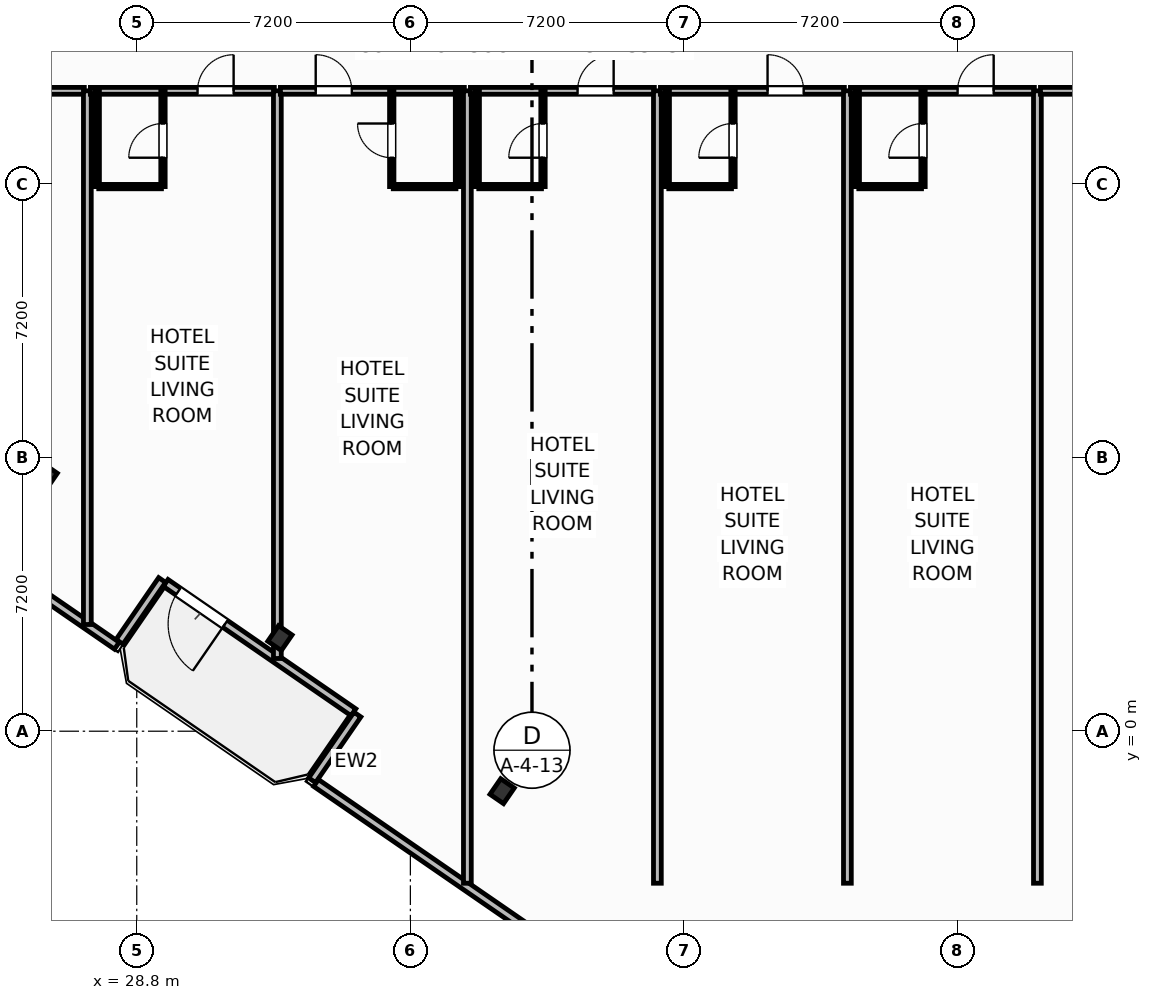
"""IFC4 building model, lengths in metres.
Left out: names, types, materials, properties, quantities, classifications, styles, units other than length and angle.
Written with IfcOpenShell. Run it as: python <this file> out.ifc"""

import sys

from ifc_helpers import new_model, si_unit, direction, frame, frame_2d, origin, origin_2d, place, context, subcontext, project, spatial, rectangle, i_section, extrude, element, fill, save


model = new_model("IFC4")
c1 = context("Model", 3, precision=1e-05, world=origin(), true_north=direction((0.0, 1.0)))
c2 = subcontext(c1, "Body", "Model", "MODEL_VIEW")
j1 = project(units=[si_unit("LENGTHUNIT", "METRE"), si_unit("PLANEANGLEUNIT", "RADIAN")], contexts=[c1])
p1 = place(None, origin())
s1 = spatial("IfcSite", under=j1, at=p1, CompositionType="ELEMENT")
p2 = place(p1, origin())
s2 = spatial("IfcBuilding", under=s1, at=p2, CompositionType="ELEMENT")
p3 = place(p2, frame((0.0, 0.0, 27.0)))
s3 = spatial("IfcBuildingStorey", under=s2, at=p3, CompositionType="ELEMENT", Elevation=27.0)
for number, where, z_axis, x_axis in (
    (1, (26.391, 6.705, -0.25), (0.0, 0.0, 1.0), (0.824, -0.567, 0.0)),
    (2, (32.568, 2.45, -0.25), (0.0, 0.0, 1.0), (0.824, -0.567, 0.0)),
    (3, (38.415, -1.577, -0.25), (0.0, 0.0, 1.0), (0.824, -0.567, 0.0)),
):
    element("IfcColumn", number, at=place(p3, frame(where, z_axis=z_axis, x_axis=x_axis)), inside=s3, PredefinedType="COLUMN", context=c2, shape_type="SweptSolid", body=[
        extrude(i_section(OverallWidth=0.432, OverallDepth=0.498, WebThickness=0.056, FlangeThickness=0.089, FilletRadius=0.025, at=origin_2d()), origin(), (0.0, 0.0, 1.0), 3.95),
    ])
p4 = place(p3, frame((34.502, 0.499, 0.0), z_axis=(0.0, 0.0, 1.0), x_axis=(-0.823534636215, 0.567265989598, 0.0)))
e4 = element("IfcWall", 4, at=p4, inside=s3, PredefinedType="SOLIDWALL", context=c2, shape_type="SweptSolid", body=[
    extrude(rectangle(XDim=6.0, YDim=0.22, at=frame_2d((3.0, 0.0))), origin(), (0.0, 0.0, 1.0), 2.73),
])
p5 = place(p4, frame((4.1, 0.0, 0.0)))
e5 = element("IfcOpeningElement", 5, at=p5, cuts=e4, PredefinedType="OPENING", context=c2, shape_type="SweptSolid", body=[
    extrude(rectangle(XDim=1.5, YDim=2.25, at=frame_2d((0.75, 1.125))), frame((0.0, 0.12, 0.0), z_axis=(0.0, -1.0, 0.0), x_axis=(1.0, 0.0, 0.0)), (0.0, 0.0, 1.0), 0.24),
])
p6 = place(p3, frame((21.659, 6.807, 0.0), z_axis=(0.0, 0.0, 1.0), x_axis=(0.823535360023, -0.567264938799, 0.0)))
e6 = element("IfcWall", 6, at=p6, inside=s3, PredefinedType="SOLIDWALL", context=c2, shape_type="SweptSolid", body=[
    extrude(rectangle(XDim=8.035, YDim=0.22, at=frame_2d((4.018, 0.0))), origin(), (0.0, 0.0, 1.0), 2.73),
])
p7 = place(p6, frame((3.192, 0.0, 0.8)))
e7 = element("IfcOpeningElement", 7, at=p7, cuts=e6, PredefinedType="OPENING", context=c2, shape_type="SweptSolid", body=[
    extrude(rectangle(XDim=1.65, YDim=1.65, at=frame_2d((0.825, 0.825))), frame((0.0, 0.12, 0.0), z_axis=(0.0, -1.0, 0.0), x_axis=(1.0, 0.0, 0.0)), (0.0, 0.0, 1.0), 0.24),
])
p8 = place(p3, frame((28.347, 2.352, 0.0), z_axis=(0.0, 0.0, 1.0), x_axis=(0.567215821234, 0.823569190865, 0.0)))
e8 = element("IfcWall", 8, at=p8, inside=s3, PredefinedType="SOLIDWALL", context=c2, shape_type="SweptSolid", body=[
    extrude(rectangle(XDim=1.975, YDim=0.22, at=frame_2d((0.988, 0.0))), origin(), (0.0, 0.0, 1.0), 2.73),
])
p9 = place(p3, frame((34.606, 0.439, 0.0), z_axis=(0.0, 0.0, 1.0), x_axis=(-0.567219383419, -0.823566737474, 0.0)))
e9 = element("IfcWall", 9, at=p9, inside=s3, PredefinedType="SOLIDWALL", context=c2, shape_type="SweptSolid", body=[
    extrude(rectangle(XDim=2.1, YDim=0.22, at=frame_2d((1.05, 0.0))), origin(), (0.0, 0.0, 1.0), 2.73),
])
p10 = place(p3, frame((33.518, -1.362, 0.0), z_axis=(0.0, 0.0, 1.0), x_axis=(0.82353935489, -0.567259139148, 0.0)))
e10 = element("IfcWall", 10, at=p10, inside=s3, PredefinedType="SOLIDWALL", context=c2, shape_type="SweptSolid", body=[
    extrude(rectangle(XDim=23.147, YDim=0.22, at=frame_2d((11.573, 0.0))), origin(), (0.0, 0.0, 1.0), 2.73),
])
p11 = place(p10, frame((10.749, 0.0, 0.8)))
e11 = element("IfcOpeningElement", 11, at=p11, cuts=e10, PredefinedType="OPENING", context=c2, shape_type="SweptSolid", body=[
    extrude(rectangle(XDim=1.65, YDim=1.65, at=frame_2d((0.825, 0.825))), frame((0.0, 0.12, 0.0), z_axis=(0.0, -1.0, 0.0), x_axis=(1.0, 0.0, 0.0)), (0.0, 0.0, 1.0), 0.24),
])
p12 = place(p3, frame((22.58, 16.85, 0.0), z_axis=(0.0, 0.0, 1.0), x_axis=(1.0, 0.0, 0.0)))
e12 = element("IfcWall", 12, at=p12, inside=s3, PredefinedType="PARTITIONING", context=c2, shape_type="SweptSolid", body=[
    extrude(rectangle(XDim=4.84, YDim=0.18, at=frame_2d((2.42, 0.0))), origin(), (0.0, 0.0, 1.0), 3.45),
])
p13 = place(p12, frame((2.819, 0.0, 0.0)))
e13 = element("IfcOpeningElement", 13, at=p13, cuts=e12, PredefinedType="OPENING", context=c2, shape_type="SweptSolid", body=[
    extrude(rectangle(XDim=0.95, YDim=2.15, at=frame_2d((0.475, 1.075))), frame((0.0, 0.1, 0.0), z_axis=(0.0, -1.0, 0.0), x_axis=(1.0, 0.0, 0.0)), (0.0, 0.0, 1.0), 0.2),
])
p14 = place(p3, frame((27.5, 2.808, 0.0), z_axis=(0.0, 0.0, 1.0), x_axis=(0.0, 1.0, 0.0)))
e14 = element("IfcWall", 14, at=p14, inside=s3, PredefinedType="PARTITIONING", context=c2, shape_type="SweptSolid", body=[
    extrude(rectangle(XDim=14.042, YDim=0.205, at=frame_2d((7.021, 0.0))), origin(), (0.0, 0.0, 1.0), 3.45),
])
p15 = place(p3, frame((27.58, 16.85, 0.0), z_axis=(0.0, 0.0, 1.0), x_axis=(1.0, 0.0, 0.0)))
e15 = element("IfcWall", 15, at=p15, inside=s3, PredefinedType="PARTITIONING", context=c2, shape_type="SweptSolid", body=[
    extrude(rectangle(XDim=4.84, YDim=0.18, at=frame_2d((2.42, 0.0))), origin(), (0.0, 0.0, 1.0), 3.45),
])
p16 = place(p15, frame((2.819, 0.0, 0.0)))
e16 = element("IfcOpeningElement", 16, at=p16, cuts=e15, PredefinedType="OPENING", context=c2, shape_type="SweptSolid", body=[
    extrude(rectangle(XDim=0.95, YDim=2.15, at=frame_2d((0.475, 1.075))), frame((0.0, 0.1, 0.0), z_axis=(0.0, -1.0, 0.0), x_axis=(1.0, 0.0, 0.0)), (0.0, 0.0, 1.0), 0.2),
])
p17 = place(p3, frame((27.8, 14.33, 0.0), z_axis=(0.0, 0.0, 1.0), x_axis=(1.0, 0.0, 0.0)))
e17 = element("IfcWall", 17, at=p17, inside=s3, PredefinedType="PARTITIONING", context=c2, shape_type="SweptSolid", body=[
    extrude(rectangle(XDim=1.65, YDim=0.115, at=frame_2d((0.825, 0.0))), origin(), (0.0, 0.0, 1.0), 3.45),
])
p18 = place(p3, frame((29.49, 14.33, 0.0), z_axis=(0.0, 0.0, 1.0), x_axis=(0.0, 1.0, 0.0)))
e18 = element("IfcWall", 18, at=p18, inside=s3, PredefinedType="PARTITIONING", context=c2, shape_type="SweptSolid", body=[
    extrude(rectangle(XDim=2.52, YDim=0.115, at=frame_2d((1.26, 0.0))), origin(), (0.0, 0.0, 1.0), 3.45),
])
p19 = place(p18, frame((0.76, 0.0, 0.0)))
e19 = element("IfcOpeningElement", 19, at=p19, cuts=e18, PredefinedType="OPENING", context=c2, shape_type="SweptSolid", body=[
    extrude(rectangle(XDim=0.9, YDim=2.05, at=frame_2d((0.45, 1.025))), frame((0.0, 0.067, 0.0), z_axis=(0.0, -1.0, 0.0), x_axis=(1.0, 0.0, 0.0)), (0.0, 0.0, 1.0), 0.135),
])
p20 = place(p3, frame((27.76, 14.33, 0.0), z_axis=(0.0, 0.0, 1.0), x_axis=(0.0, 1.0, 0.0)))
e20 = element("IfcWall", 20, at=p20, inside=s3, PredefinedType="PARTITIONING", context=c2, shape_type="SweptSolid", body=[
    extrude(rectangle(XDim=2.52, YDim=0.115, at=frame_2d((1.26, 0.0))), origin(), (0.0, 0.0, 1.0), 3.45),
])
p21 = place(p3, frame((32.5, 1.914, 0.0), z_axis=(0.0, 0.0, 1.0), x_axis=(0.0, 1.0, 0.0)))
e21 = element("IfcWall", 21, at=p21, inside=s3, PredefinedType="PARTITIONING", context=c2, shape_type="SweptSolid", body=[
    extrude(rectangle(XDim=14.936, YDim=0.205, at=frame_2d((7.468, 0.0))), origin(), (0.0, 0.0, 1.0), 2.58),
])
p22 = place(p3, frame((32.58, 16.85, 0.0), z_axis=(0.0, 0.0, 1.0), x_axis=(1.0, 0.0, 0.0)))
e22 = element("IfcWall", 22, at=p22, inside=s3, PredefinedType="PARTITIONING", context=c2, shape_type="SweptSolid", body=[
    extrude(rectangle(XDim=4.84, YDim=0.18, at=frame_2d((2.42, 0.0))), origin(), (0.0, 0.0, 1.0), 3.45),
])
p23 = place(p22, frame((0.929, 0.0, 0.0)))
e23 = element("IfcOpeningElement", 23, at=p23, cuts=e22, PredefinedType="OPENING", context=c2, shape_type="SweptSolid", body=[
    extrude(rectangle(XDim=0.95, YDim=2.15, at=frame_2d((0.475, 1.075))), frame((0.0, 0.1, 0.0), z_axis=(0.0, -1.0, 0.0), x_axis=(1.0, 0.0, 0.0)), (0.0, 0.0, 1.0), 0.2),
])
p24 = place(p3, frame((35.55, 14.33, 0.0), z_axis=(0.0, 0.0, 1.0), x_axis=(1.0, 0.0, 0.0)))
e24 = element("IfcWall", 24, at=p24, inside=s3, PredefinedType="PARTITIONING", context=c2, shape_type="SweptSolid", body=[
    extrude(rectangle(XDim=1.65, YDim=0.115, at=frame_2d((0.825, 0.0))), origin(), (0.0, 0.0, 1.0), 3.45),
])
p25 = place(p3, frame((35.51, 14.33, 0.0), z_axis=(0.0, 0.0, 1.0), x_axis=(0.0, 1.0, 0.0)))
e25 = element("IfcWall", 25, at=p25, inside=s3, PredefinedType="PARTITIONING", context=c2, shape_type="SweptSolid", body=[
    extrude(rectangle(XDim=2.52, YDim=0.115, at=frame_2d((1.26, 0.0))), origin(), (0.0, 0.0, 1.0), 3.45),
])
p26 = place(p25, frame((0.76, 0.0, 0.0)))
e26 = element("IfcOpeningElement", 26, at=p26, cuts=e25, PredefinedType="OPENING", context=c2, shape_type="SweptSolid", body=[
    extrude(rectangle(XDim=0.9, YDim=2.05, at=frame_2d((0.45, 1.025))), frame((0.0, 0.067, 0.0), z_axis=(0.0, -1.0, 0.0), x_axis=(1.0, 0.0, 0.0)), (0.0, 0.0, 1.0), 0.135),
])
p27 = place(p3, frame((37.24, 14.33, 0.0), z_axis=(0.0, 0.0, 1.0), x_axis=(0.0, 1.0, 0.0)))
e27 = element("IfcWall", 27, at=p27, inside=s3, PredefinedType="PARTITIONING", context=c2, shape_type="SweptSolid", body=[
    extrude(rectangle(XDim=2.52, YDim=0.115, at=frame_2d((1.26, 0.0))), origin(), (0.0, 0.0, 1.0), 3.45),
])
p28 = place(p3, frame((37.5, -4.0, 0.0), z_axis=(0.0, 0.0, 1.0), x_axis=(0.0, 1.0, 0.0)))
e28 = element("IfcWall", 28, at=p28, inside=s3, PredefinedType="PARTITIONING", context=c2, shape_type="SweptSolid", body=[
    extrude(rectangle(XDim=20.85, YDim=0.205, at=frame_2d((10.425, 0.0))), origin(), (0.0, 0.0, 1.0), 3.45),
])
p29 = place(p3, frame((37.58, 16.85, 0.0), z_axis=(0.0, 0.0, 1.0), x_axis=(1.0, 0.0, 0.0)))
e29 = element("IfcWall", 29, at=p29, inside=s3, PredefinedType="PARTITIONING", context=c2, shape_type="SweptSolid", body=[
    extrude(rectangle(XDim=4.84, YDim=0.18, at=frame_2d((2.42, 0.0))), origin(), (0.0, 0.0, 1.0), 3.45),
])
p30 = place(p29, frame((2.819, 0.0, 0.0)))
e30 = element("IfcOpeningElement", 30, at=p30, cuts=e29, PredefinedType="OPENING", context=c2, shape_type="SweptSolid", body=[
    extrude(rectangle(XDim=0.95, YDim=2.15, at=frame_2d((0.475, 1.075))), frame((0.0, 0.1, 0.0), z_axis=(0.0, -1.0, 0.0), x_axis=(1.0, 0.0, 0.0)), (0.0, 0.0, 1.0), 0.2),
])
p31 = place(p3, frame((37.8, 14.33, 0.0), z_axis=(0.0, 0.0, 1.0), x_axis=(1.0, 0.0, 0.0)))
e31 = element("IfcWall", 31, at=p31, inside=s3, PredefinedType="PARTITIONING", context=c2, shape_type="SweptSolid", body=[
    extrude(rectangle(XDim=1.65, YDim=0.115, at=frame_2d((0.825, 0.0))), origin(), (0.0, 0.0, 1.0), 3.45),
])
p32 = place(p3, frame((39.49, 14.33, 0.0), z_axis=(0.0, 0.0, 1.0), x_axis=(0.0, 1.0, 0.0)))
e32 = element("IfcWall", 32, at=p32, inside=s3, PredefinedType="PARTITIONING", context=c2, shape_type="SweptSolid", body=[
    extrude(rectangle(XDim=2.52, YDim=0.115, at=frame_2d((1.26, 0.0))), origin(), (0.0, 0.0, 1.0), 3.45),
])
p33 = place(p32, frame((0.76, 0.0, 0.0)))
e33 = element("IfcOpeningElement", 33, at=p33, cuts=e32, PredefinedType="OPENING", context=c2, shape_type="SweptSolid", body=[
    extrude(rectangle(XDim=0.9, YDim=2.05, at=frame_2d((0.45, 1.025))), frame((0.0, 0.067, 0.0), z_axis=(0.0, -1.0, 0.0), x_axis=(1.0, 0.0, 0.0)), (0.0, 0.0, 1.0), 0.135),
])
p34 = place(p3, frame((37.76, 14.33, 0.0), z_axis=(0.0, 0.0, 1.0), x_axis=(0.0, 1.0, 0.0)))
e34 = element("IfcWall", 34, at=p34, inside=s3, PredefinedType="PARTITIONING", context=c2, shape_type="SweptSolid", body=[
    extrude(rectangle(XDim=2.52, YDim=0.115, at=frame_2d((1.26, 0.0))), origin(), (0.0, 0.0, 1.0), 3.45),
])
p35 = place(p3, frame((42.5, -4.0, 0.0), z_axis=(0.0, 0.0, 1.0), x_axis=(0.0, 1.0, 0.0)))
e35 = element("IfcWall", 35, at=p35, inside=s3, PredefinedType="PARTITIONING", context=c2, shape_type="SweptSolid", body=[
    extrude(rectangle(XDim=20.85, YDim=0.205, at=frame_2d((10.425, 0.0))), origin(), (0.0, 0.0, 1.0), 2.58),
])
p36 = place(p3, frame((42.58, 16.85, 0.0), z_axis=(0.0, 0.0, 1.0), x_axis=(1.0, 0.0, 0.0)))
e36 = element("IfcWall", 36, at=p36, inside=s3, PredefinedType="PARTITIONING", context=c2, shape_type="SweptSolid", body=[
    extrude(rectangle(XDim=4.84, YDim=0.18, at=frame_2d((2.42, 0.0))), origin(), (0.0, 0.0, 1.0), 3.45),
])
p37 = place(p36, frame((2.819, 0.0, 0.0)))
e37 = element("IfcOpeningElement", 37, at=p37, cuts=e36, PredefinedType="OPENING", context=c2, shape_type="SweptSolid", body=[
    extrude(rectangle(XDim=0.95, YDim=2.15, at=frame_2d((0.475, 1.075))), frame((0.0, 0.1, 0.0), z_axis=(0.0, -1.0, 0.0), x_axis=(1.0, 0.0, 0.0)), (0.0, 0.0, 1.0), 0.2),
])
p38 = place(p3, frame((42.8, 14.33, 0.0), z_axis=(0.0, 0.0, 1.0), x_axis=(1.0, 0.0, 0.0)))
e38 = element("IfcWall", 38, at=p38, inside=s3, PredefinedType="PARTITIONING", context=c2, shape_type="SweptSolid", body=[
    extrude(rectangle(XDim=1.65, YDim=0.115, at=frame_2d((0.825, 0.0))), origin(), (0.0, 0.0, 1.0), 3.45),
])
p39 = place(p3, frame((44.49, 14.33, 0.0), z_axis=(0.0, 0.0, 1.0), x_axis=(0.0, 1.0, 0.0)))
e39 = element("IfcWall", 39, at=p39, inside=s3, PredefinedType="PARTITIONING", context=c2, shape_type="SweptSolid", body=[
    extrude(rectangle(XDim=2.52, YDim=0.115, at=frame_2d((1.26, 0.0))), origin(), (0.0, 0.0, 1.0), 3.45),
])
p40 = place(p39, frame((0.76, 0.0, 0.0)))
e40 = element("IfcOpeningElement", 40, at=p40, cuts=e39, PredefinedType="OPENING", context=c2, shape_type="SweptSolid", body=[
    extrude(rectangle(XDim=0.9, YDim=2.05, at=frame_2d((0.45, 1.025))), frame((0.0, 0.067, 0.0), z_axis=(0.0, -1.0, 0.0), x_axis=(1.0, 0.0, 0.0)), (0.0, 0.0, 1.0), 0.135),
])
p41 = place(p3, frame((42.76, 14.33, 0.0), z_axis=(0.0, 0.0, 1.0), x_axis=(0.0, 1.0, 0.0)))
e41 = element("IfcWall", 41, at=p41, inside=s3, PredefinedType="PARTITIONING", context=c2, shape_type="SweptSolid", body=[
    extrude(rectangle(XDim=2.52, YDim=0.115, at=frame_2d((1.26, 0.0))), origin(), (0.0, 0.0, 1.0), 3.45),
])
p42 = place(p3, frame((47.5, -4.0, 0.0), z_axis=(0.0, 0.0, 1.0), x_axis=(0.0, 1.0, 0.0)))
e42 = element("IfcWall", 42, at=p42, inside=s3, PredefinedType="PARTITIONING", context=c2, shape_type="SweptSolid", body=[
    extrude(rectangle(XDim=20.85, YDim=0.205, at=frame_2d((10.425, 0.0))), origin(), (0.0, 0.0, 1.0), 3.45),
])
p43 = place(p3, frame((47.58, 16.85, 0.0), z_axis=(0.0, 0.0, 1.0), x_axis=(1.0, 0.0, 0.0)))
e43 = element("IfcWall", 43, at=p43, inside=s3, PredefinedType="PARTITIONING", context=c2, shape_type="SweptSolid", body=[
    extrude(rectangle(XDim=4.84, YDim=0.18, at=frame_2d((2.42, 0.0))), origin(), (0.0, 0.0, 1.0), 3.45),
])
p44 = place(p43, frame((2.819, 0.0, 0.0)))
e44 = element("IfcOpeningElement", 44, at=p44, cuts=e43, PredefinedType="OPENING", context=c2, shape_type="SweptSolid", body=[
    extrude(rectangle(XDim=0.95, YDim=2.15, at=frame_2d((0.475, 1.075))), frame((0.0, 0.1, 0.0), z_axis=(0.0, -1.0, 0.0), x_axis=(1.0, 0.0, 0.0)), (0.0, 0.0, 1.0), 0.2),
])
p45 = place(p3, frame((47.8, 14.33, 0.0), z_axis=(0.0, 0.0, 1.0), x_axis=(1.0, 0.0, 0.0)))
e45 = element("IfcWall", 45, at=p45, inside=s3, PredefinedType="PARTITIONING", context=c2, shape_type="SweptSolid", body=[
    extrude(rectangle(XDim=1.65, YDim=0.115, at=frame_2d((0.825, 0.0))), origin(), (0.0, 0.0, 1.0), 3.45),
])
p46 = place(p3, frame((49.49, 14.33, 0.0), z_axis=(0.0, 0.0, 1.0), x_axis=(0.0, 1.0, 0.0)))
e46 = element("IfcWall", 46, at=p46, inside=s3, PredefinedType="PARTITIONING", context=c2, shape_type="SweptSolid", body=[
    extrude(rectangle(XDim=2.52, YDim=0.115, at=frame_2d((1.26, 0.0))), origin(), (0.0, 0.0, 1.0), 3.45),
])
p47 = place(p46, frame((0.76, 0.0, 0.0)))
e47 = element("IfcOpeningElement", 47, at=p47, cuts=e46, PredefinedType="OPENING", context=c2, shape_type="SweptSolid", body=[
    extrude(rectangle(XDim=0.9, YDim=2.05, at=frame_2d((0.45, 1.025))), frame((0.0, 0.067, 0.0), z_axis=(0.0, -1.0, 0.0), x_axis=(1.0, 0.0, 0.0)), (0.0, 0.0, 1.0), 0.135),
])
p48 = place(p3, frame((47.76, 14.33, 0.0), z_axis=(0.0, 0.0, 1.0), x_axis=(0.0, 1.0, 0.0)))
e48 = element("IfcWall", 48, at=p48, inside=s3, PredefinedType="PARTITIONING", context=c2, shape_type="SweptSolid", body=[
    extrude(rectangle(XDim=2.52, YDim=0.115, at=frame_2d((1.26, 0.0))), origin(), (0.0, 0.0, 1.0), 3.45),
])
p49 = place(p3, frame((52.5, -4.0, 0.0), z_axis=(0.0, 0.0, 1.0), x_axis=(0.0, 1.0, 0.0)))
e49 = element("IfcWall", 49, at=p49, inside=s3, PredefinedType="PARTITIONING", context=c2, shape_type="SweptSolid", body=[
    extrude(rectangle(XDim=20.85, YDim=0.205, at=frame_2d((10.425, 0.0))), origin(), (0.0, 0.0, 1.0), 3.45),
])
p50 = place(p3, frame((52.58, 16.85, 0.0), z_axis=(0.0, 0.0, 1.0), x_axis=(1.0, 0.0, 0.0)))
e50 = element("IfcWall", 50, at=p50, inside=s3, PredefinedType="PARTITIONING", context=c2, shape_type="SweptSolid", body=[
    extrude(rectangle(XDim=4.84, YDim=0.18, at=frame_2d((2.42, 0.0))), origin(), (0.0, 0.0, 1.0), 3.45),
])
p51 = place(p50, frame((0.929, 0.0, 0.0)))
e51 = element("IfcOpeningElement", 51, at=p51, cuts=e50, PredefinedType="OPENING", context=c2, shape_type="SweptSolid", body=[
    extrude(rectangle(XDim=0.95, YDim=2.15, at=frame_2d((0.475, 1.075))), frame((0.0, 0.1, 0.0), z_axis=(0.0, -1.0, 0.0), x_axis=(1.0, 0.0, 0.0)), (0.0, 0.0, 1.0), 0.2),
])
p52 = place(p5, origin())
e52 = element("IfcDoor", 52, at=p52, inside=s3, OperationType="SINGLE_SWING_LEFT", PredefinedType="DOOR", context=c2, shape_type="SweptSolid", body=[
    extrude(rectangle(XDim=1.5, YDim=2.25, at=frame_2d((0.75, 1.125))), frame((0.0, 0.025, 0.0), z_axis=(0.0, -1.0, 0.0), x_axis=(1.0, 0.0, 0.0)), (0.0, 0.0, 1.0), 0.05),
])
fill(e5, e52)
p53 = place(p16, origin())
e53 = element("IfcDoor", 53, at=p53, inside=s3, OperationType="SINGLE_SWING_RIGHT", PredefinedType="DOOR", context=c2, shape_type="SweptSolid", body=[
    extrude(rectangle(XDim=0.95, YDim=2.15, at=frame_2d((0.475, 1.075))), frame((0.0, 0.025, 0.0), z_axis=(0.0, -1.0, 0.0), x_axis=(1.0, 0.0, 0.0)), (0.0, 0.0, 1.0), 0.05),
])
fill(e16, e53)
p54 = place(p19, origin())
e54 = element("IfcDoor", 54, at=p54, inside=s3, OperationType="SINGLE_SWING_LEFT", PredefinedType="DOOR", context=c2, shape_type="SweptSolid", body=[
    extrude(rectangle(XDim=0.9, YDim=2.05, at=frame_2d((0.45, 1.025))), frame((0.0, 0.025, 0.0), z_axis=(0.0, -1.0, 0.0), x_axis=(1.0, 0.0, 0.0)), (0.0, 0.0, 1.0), 0.05),
])
fill(e19, e54)
p55 = place(p23, origin())
e55 = element("IfcDoor", 55, at=p55, inside=s3, OperationType="SINGLE_SWING_LEFT", PredefinedType="DOOR", context=c2, shape_type="SweptSolid", body=[
    extrude(rectangle(XDim=0.95, YDim=2.15, at=frame_2d((0.475, 1.075))), frame((0.0, 0.025, 0.0), z_axis=(0.0, -1.0, 0.0), x_axis=(1.0, 0.0, 0.0)), (0.0, 0.0, 1.0), 0.05),
])
fill(e23, e55)
p56 = place(p26, origin())
e56 = element("IfcDoor", 56, at=p56, inside=s3, OperationType="SINGLE_SWING_RIGHT", PredefinedType="DOOR", context=c2, shape_type="SweptSolid", body=[
    extrude(rectangle(XDim=0.9, YDim=2.05, at=frame_2d((0.45, 1.025))), frame((0.0, 0.025, 0.0), z_axis=(0.0, -1.0, 0.0), x_axis=(1.0, 0.0, 0.0)), (0.0, 0.0, 1.0), 0.05),
])
fill(e26, e56)
p57 = place(p30, origin())
e57 = element("IfcDoor", 57, at=p57, inside=s3, OperationType="SINGLE_SWING_RIGHT", PredefinedType="DOOR", context=c2, shape_type="SweptSolid", body=[
    extrude(rectangle(XDim=0.95, YDim=2.15, at=frame_2d((0.475, 1.075))), frame((0.0, 0.025, 0.0), z_axis=(0.0, -1.0, 0.0), x_axis=(1.0, 0.0, 0.0)), (0.0, 0.0, 1.0), 0.05),
])
fill(e30, e57)
p58 = place(p33, origin())
e58 = element("IfcDoor", 58, at=p58, inside=s3, OperationType="SINGLE_SWING_LEFT", PredefinedType="DOOR", context=c2, shape_type="SweptSolid", body=[
    extrude(rectangle(XDim=0.9, YDim=2.05, at=frame_2d((0.45, 1.025))), frame((0.0, 0.025, 0.0), z_axis=(0.0, -1.0, 0.0), x_axis=(1.0, 0.0, 0.0)), (0.0, 0.0, 1.0), 0.05),
])
fill(e33, e58)
p59 = place(p37, origin())
e59 = element("IfcDoor", 59, at=p59, inside=s3, OperationType="SINGLE_SWING_LEFT", PredefinedType="DOOR", context=c2, shape_type="SweptSolid", body=[
    extrude(rectangle(XDim=0.95, YDim=2.15, at=frame_2d((0.475, 1.075))), frame((0.0, 0.025, 0.0), z_axis=(0.0, -1.0, 0.0), x_axis=(1.0, 0.0, 0.0)), (0.0, 0.0, 1.0), 0.05),
])
fill(e37, e59)
p60 = place(p40, origin())
e60 = element("IfcDoor", 60, at=p60, inside=s3, OperationType="SINGLE_SWING_LEFT", PredefinedType="DOOR", context=c2, shape_type="SweptSolid", body=[
    extrude(rectangle(XDim=0.9, YDim=2.05, at=frame_2d((0.45, 1.025))), frame((0.0, 0.025, 0.0), z_axis=(0.0, -1.0, 0.0), x_axis=(1.0, 0.0, 0.0)), (0.0, 0.0, 1.0), 0.05),
])
fill(e40, e60)
p61 = place(p44, origin())
e61 = element("IfcDoor", 61, at=p61, inside=s3, OperationType="SINGLE_SWING_RIGHT", PredefinedType="DOOR", context=c2, shape_type="SweptSolid", body=[
    extrude(rectangle(XDim=0.95, YDim=2.15, at=frame_2d((0.475, 1.075))), frame((0.0, 0.025, 0.0), z_axis=(0.0, -1.0, 0.0), x_axis=(1.0, 0.0, 0.0)), (0.0, 0.0, 1.0), 0.05),
])
fill(e44, e61)
p62 = place(p47, origin())
e62 = element("IfcDoor", 62, at=p62, inside=s3, OperationType="SINGLE_SWING_LEFT", PredefinedType="DOOR", context=c2, shape_type="SweptSolid", body=[
    extrude(rectangle(XDim=0.9, YDim=2.05, at=frame_2d((0.45, 1.025))), frame((0.0, 0.025, 0.0), z_axis=(0.0, -1.0, 0.0), x_axis=(1.0, 0.0, 0.0)), (0.0, 0.0, 1.0), 0.05),
])
fill(e47, e62)
save(model, sys.argv[1])
